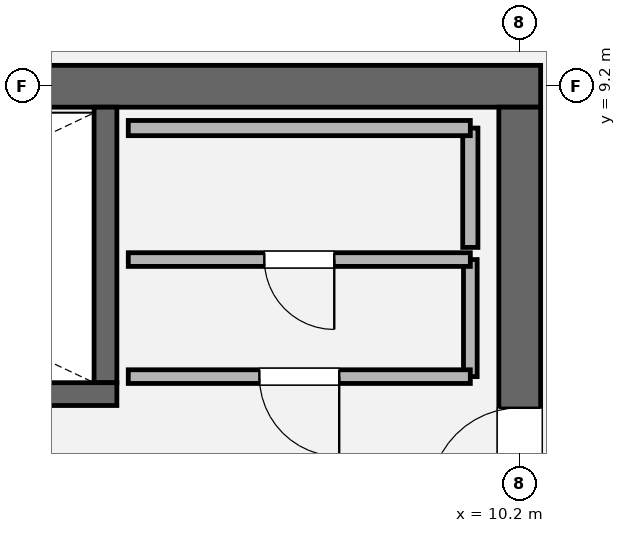
"""IFC4 building model, lengths in metres.
Left out: names, types, materials, properties, quantities, classifications, styles, units other than length and angle.
Written with IfcOpenShell. Run it as: python <this file> out.ifc"""

import sys

from ifc_helpers import new_model, si_unit, direction, frame, frame_2d, origin, place, context, subcontext, project, spatial, rectangle, extrude, element, fill, save


model = new_model("IFC4")
c1 = context("Model", 3, precision=1e-05, world=origin(), true_north=direction((0.0, 1.0)))
c2 = subcontext(c1, "Body", "Model", "MODEL_VIEW")
j1 = project(units=[si_unit("LENGTHUNIT", "METRE"), si_unit("PLANEANGLEUNIT", "RADIAN")], contexts=[c1])
p1 = place(None, origin())
s1 = spatial("IfcSite", under=j1, at=p1, CompositionType="ELEMENT")
p2 = place(p1, origin())
s2 = spatial("IfcBuilding", under=s1, at=p2, CompositionType="ELEMENT")
p3 = place(p2, frame((0.0, 0.0, 271.65)))
s3 = spatial("IfcBuildingStorey", under=s2, at=p3, CompositionType="ELEMENT", Elevation=271.65)
p4 = place(p3, frame((-10.475, 9.2, 0.0), z_axis=(0.0, 0.0, 1.0), x_axis=(1.0, 0.0, 0.0)))
e1 = element("IfcWall", 1, at=p4, inside=s3, PredefinedType="SHEAR", context=c2, shape_type="SweptSolid", body=[
    extrude(rectangle(XDim=20.95, YDim=0.55, at=frame_2d((10.475, 0.0))), origin(), (0.0, 0.0, 1.0), 4.05),
])
p5 = place(p3, frame((10.2, 8.925, 0.0), z_axis=(0.0, 0.0, 1.0), x_axis=(0.0, -1.0, 0.0)))
e2 = element("IfcWall", 2, at=p5, inside=s3, PredefinedType="SHEAR", context=c2, shape_type="SweptSolid", body=[
    extrude(rectangle(XDim=17.85, YDim=0.55, at=frame_2d((8.925, 0.0))), origin(), (0.0, 0.0, 1.0), 4.05),
])
p6 = place(p5, frame((3.955, 0.0, 0.0)))
e3 = element("IfcOpeningElement", 3, at=p6, cuts=e2, PredefinedType="OPENING", context=c2, shape_type="SweptSolid", body=[
    extrude(rectangle(XDim=1.18, YDim=2.2, at=frame_2d((0.59, 1.1))), frame((0.0, 0.285, 0.0), z_axis=(0.0, -1.0, 0.0), x_axis=(1.0, 0.0, 0.0)), (0.0, 0.0, 1.0), 0.57),
])
p7 = place(p3, frame((4.75, 8.925, 0.0), z_axis=(0.0, 0.0, 1.0), x_axis=(0.0, -1.0, 0.0)))
e4 = element("IfcWall", 4, at=p7, inside=s3, PredefinedType="SOLIDWALL", context=c2, shape_type="SweptSolid", body=[
    extrude(rectangle(XDim=3.625, YDim=0.3, at=frame_2d((1.812, 0.0))), origin(), (0.0, 0.0, 1.0), 4.05),
])
p8 = place(p3, frame((-4.9, 5.15, 0.0), z_axis=(0.0, 0.0, 1.0), x_axis=(1.0, 0.0, 0.0)))
e5 = element("IfcWall", 5, at=p8, inside=s3, PredefinedType="SOLIDWALL", context=c2, shape_type="SweptSolid", body=[
    extrude(rectangle(XDim=9.8, YDim=0.3, at=frame_2d((4.9, 0.0))), origin(), (0.0, 0.0, 1.0), 4.05),
])
p9 = place(p8, frame((0.56, 0.0, 0.0)))
e6 = element("IfcOpeningElement", 6, at=p9, cuts=e5, PredefinedType="OPENING", context=c2, shape_type="SweptSolid", body=[
    extrude(rectangle(XDim=1.18, YDim=2.2, at=frame_2d((0.59, 1.1))), frame((0.0, 0.16, 0.0), z_axis=(0.0, -1.0, 0.0), x_axis=(1.0, 0.0, 0.0)), (0.0, 0.0, 1.0), 0.32),
])
p10 = place(p3, frame((9.55, 5.38, 0.0), z_axis=(0.0, 0.0, 1.0), x_axis=(0.0, 1.0, 0.0)))
e7 = element("IfcWall", 7, at=p10, inside=s3, PredefinedType="PARTITIONING", context=c2, shape_type="SweptSolid", body=[
    extrude(rectangle(XDim=1.54, YDim=0.18, at=frame_2d((0.77, 0.0))), origin(), (0.0, 0.0, 1.0), 3.85),
])
p11 = place(p3, frame((9.55, 6.92, 0.0), z_axis=(0.0, 0.0, 1.0), x_axis=(-1.0, 0.0, 0.0)))
e8 = element("IfcWall", 8, at=p11, inside=s3, PredefinedType="PARTITIONING", context=c2, shape_type="SweptSolid", body=[
    extrude(rectangle(XDim=4.5, YDim=0.18, at=frame_2d((2.25, 0.0))), origin(), (0.0, 0.0, 1.0), 3.85),
])
p12 = place(p11, frame((1.79, 0.0, 0.0)))
e9 = element("IfcOpeningElement", 9, at=p12, cuts=e8, PredefinedType="OPENING", context=c2, shape_type="SweptSolid", body=[
    extrude(rectangle(XDim=0.92, YDim=2.1, at=frame_2d((0.46, 1.05))), frame((0.0, 0.1, 0.0), z_axis=(0.0, -1.0, 0.0), x_axis=(1.0, 0.0, 0.0)), (0.0, 0.0, 1.0), 0.2),
])
p13 = place(p3, frame((5.05, 5.38, 0.0), z_axis=(0.0, 0.0, 1.0), x_axis=(1.0, 0.0, 0.0)))
e10 = element("IfcWall", 10, at=p13, inside=s3, PredefinedType="PARTITIONING", context=c2, shape_type="SweptSolid", body=[
    extrude(rectangle(XDim=4.5, YDim=0.18, at=frame_2d((2.25, 0.0))), origin(), (0.0, 0.0, 1.0), 3.85),
])
p14 = place(p13, frame((1.725, 0.0, 0.0)))
e11 = element("IfcOpeningElement", 11, at=p14, cuts=e10, PredefinedType="OPENING", context=c2, shape_type="SweptSolid", body=[
    extrude(rectangle(XDim=1.05, YDim=2.2, at=frame_2d((0.525, 1.1))), frame((0.0, 0.1, 0.0), z_axis=(0.0, -1.0, 0.0), x_axis=(1.0, 0.0, 0.0)), (0.0, 0.0, 1.0), 0.2),
])
p15 = place(p3, frame((9.55, 7.08, 0.0), z_axis=(0.0, 0.0, 1.0), x_axis=(0.0, 1.0, 0.0)))
e12 = element("IfcWall", 12, at=p15, inside=s3, PredefinedType="SOLIDWALL", context=c2, shape_type="SweptSolid", body=[
    extrude(rectangle(XDim=1.57, YDim=0.2, at=frame_2d((0.785, 0.0))), origin(), (0.0, 0.0, 1.0), 3.85),
])
p16 = place(p3, frame((9.55, 8.65, 0.0), z_axis=(0.0, 0.0, 1.0), x_axis=(-1.0, 0.0, 0.0)))
e13 = element("IfcWall", 13, at=p16, inside=s3, PredefinedType="SOLIDWALL", context=c2, shape_type="SweptSolid", body=[
    extrude(rectangle(XDim=4.5, YDim=0.2, at=frame_2d((2.25, 0.0))), origin(), (0.0, 0.0, 1.0), 3.85),
])
p17 = place(p6, origin())
e14 = element("IfcDoor", 14, at=p17, inside=s3, OperationType="SINGLE_SWING_RIGHT", PredefinedType="DOOR", context=c2, shape_type="SweptSolid", body=[
    extrude(rectangle(XDim=1.18, YDim=2.2, at=frame_2d((0.59, 1.1))), frame((0.0, 0.025, 0.0), z_axis=(0.0, -1.0, 0.0), x_axis=(1.0, 0.0, 0.0)), (0.0, 0.0, 1.0), 0.05),
])
fill(e3, e14)
p18 = place(p14, origin())
e15 = element("IfcDoor", 15, at=p18, inside=s3, OperationType="SINGLE_SWING_RIGHT", PredefinedType="DOOR", context=c2, shape_type="SweptSolid", body=[
    extrude(rectangle(XDim=1.05, YDim=2.2, at=frame_2d((0.525, 1.1))), frame((0.0, 0.025, 0.0), z_axis=(0.0, -1.0, 0.0), x_axis=(1.0, 0.0, 0.0)), (0.0, 0.0, 1.0), 0.05),
])
fill(e11, e15)
p19 = place(p12, origin())
e16 = element("IfcDoor", 16, at=p19, inside=s3, OperationType="SINGLE_SWING_LEFT", PredefinedType="DOOR", context=c2, shape_type="SweptSolid", body=[
    extrude(rectangle(XDim=0.92, YDim=2.1, at=frame_2d((0.46, 1.05))), frame((0.0, 0.025, 0.0), z_axis=(0.0, -1.0, 0.0), x_axis=(1.0, 0.0, 0.0)), (0.0, 0.0, 1.0), 0.05),
])
fill(e9, e16)
save(model, sys.argv[1])
